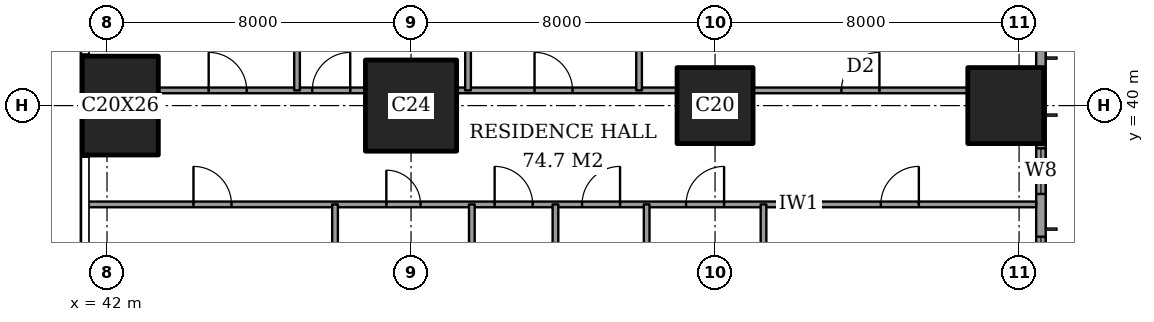
"""IFC4 building model, lengths in metres.
Left out: names, types, materials, properties, quantities, classifications, styles, units other than length and angle.
Written with IfcOpenShell. Run it as: python <this file> out.ifc"""

import sys

from ifc_helpers import new_model, si_unit, direction, frame, frame_2d, origin, origin_2d, place, context, subcontext, project, spatial, rectangle, extrude, element, fill, save


model = new_model("IFC4")
c1 = context("Model", 3, precision=1e-05, world=origin(), true_north=direction((0.0, 1.0)))
c2 = subcontext(c1, "Body", "Model", "MODEL_VIEW")
j1 = project(units=[si_unit("LENGTHUNIT", "METRE"), si_unit("PLANEANGLEUNIT", "RADIAN")], contexts=[c1])
p1 = place(None, origin())
s1 = spatial("IfcSite", under=j1, at=p1, CompositionType="ELEMENT")
p2 = place(p1, origin())
s2 = spatial("IfcBuilding", under=s1, at=p2, CompositionType="ELEMENT")
p3 = place(p2, frame((0.0, 0.0, 69.2)))
s3 = spatial("IfcBuildingStorey", under=s2, at=p3, CompositionType="ELEMENT", Elevation=69.2)
p4 = place(p3, frame((42.35, 40.0, 0.0), z_axis=(0.0, 0.0, 1.0), x_axis=(1.0, 0.0, 0.0)))
e1 = element("IfcColumn", 1, at=p4, inside=s3, PredefinedType="COLUMN", context=c2, shape_type="SweptSolid", body=[
    extrude(rectangle(XDim=2.0, YDim=2.6, at=origin_2d()), origin(), (0.0, 0.0, 1.0), 3.6),
])
p5 = place(p3, frame((50.0, 40.0, 0.0), z_axis=(0.0, 0.0, 1.0), x_axis=(1.0, 0.0, 0.0)))
e2 = element("IfcColumn", 2, at=p5, inside=s3, PredefinedType="COLUMN", context=c2, shape_type="SweptSolid", body=[
    extrude(rectangle(XDim=2.4, YDim=2.4, at=origin_2d()), origin(), (0.0, 0.0, 1.0), 3.6),
])
for number, where, z_axis, x_axis in (
    (3, (58.0, 40.0, 0.0), (0.0, 0.0, 1.0), (1.0, 0.0, 0.0)),
    (4, (65.65, 40.0, 0.0), (0.0, 0.0, 1.0), (1.0, 0.0, 0.0)),
):
    element("IfcColumn", number, at=place(p3, frame(where, z_axis=z_axis, x_axis=x_axis)), inside=s3, PredefinedType="COLUMN", context=c2, shape_type="SweptSolid", body=[
        extrude(rectangle(XDim=2.0, YDim=2.0, at=origin_2d()), origin(), (0.0, 0.0, 1.0), 3.6),
    ])
p6 = place(p3, frame((66.575, 3.175, 0.0), z_axis=(0.0, 0.0, 1.0), x_axis=(0.0, 1.0, 0.0)))
e5 = element("IfcWall", 5, at=p6, inside=s3, PredefinedType="SOLIDWALL", context=c2, shape_type="SweptSolid", body=[
    extrude(rectangle(XDim=41.65, YDim=0.25, at=frame_2d((20.825, 0.0))), origin(), (0.0, 0.0, 1.0), 3.6),
])
p7 = place(p6, frame((0.775, 0.0, 0.6)))
e6 = element("IfcOpeningElement", 6, at=p7, cuts=e5, PredefinedType="OPENING", context=c2, shape_type="SweptSolid", body=[
    extrude(rectangle(XDim=2.4, YDim=2.0, at=frame_2d((1.2, 1.0))), frame((0.0, 0.135, 0.0), z_axis=(0.0, -1.0, 0.0), x_axis=(1.0, 0.0, 0.0)), (0.0, 0.0, 1.0), 0.27),
])
p8 = place(p6, frame((6.1, 0.0, 0.6)))
e7 = element("IfcOpeningElement", 7, at=p8, cuts=e5, PredefinedType="OPENING", context=c2, shape_type="SweptSolid", body=[
    extrude(rectangle(XDim=1.2, YDim=2.0, at=frame_2d((0.6, 1.0))), frame((0.0, 0.135, 0.0), z_axis=(0.0, -1.0, 0.0), x_axis=(1.0, 0.0, 0.0)), (0.0, 0.0, 1.0), 0.27),
])
p9 = place(p6, frame((8.275, 0.0, 0.6)))
e8 = element("IfcOpeningElement", 8, at=p9, cuts=e5, PredefinedType="OPENING", context=c2, shape_type="SweptSolid", body=[
    extrude(rectangle(XDim=2.4, YDim=2.0, at=frame_2d((1.2, 1.0))), frame((0.0, 0.135, 0.0), z_axis=(0.0, -1.0, 0.0), x_axis=(1.0, 0.0, 0.0)), (0.0, 0.0, 1.0), 0.27),
])
p10 = place(p6, frame((15.775, 0.0, 0.6)))
e9 = element("IfcOpeningElement", 9, at=p10, cuts=e5, PredefinedType="OPENING", context=c2, shape_type="SweptSolid", body=[
    extrude(rectangle(XDim=2.4, YDim=2.0, at=frame_2d((1.2, 1.0))), frame((0.0, 0.135, 0.0), z_axis=(0.0, -1.0, 0.0), x_axis=(1.0, 0.0, 0.0)), (0.0, 0.0, 1.0), 0.27),
])
p11 = place(p6, frame((23.475, 0.0, 0.6)))
e10 = element("IfcOpeningElement", 10, at=p11, cuts=e5, PredefinedType="OPENING", context=c2, shape_type="SweptSolid", body=[
    extrude(rectangle(XDim=2.4, YDim=2.0, at=frame_2d((1.2, 1.0))), frame((0.0, 0.135, 0.0), z_axis=(0.0, -1.0, 0.0), x_axis=(1.0, 0.0, 0.0)), (0.0, 0.0, 1.0), 0.27),
])
p12 = place(p6, frame((30.975, 0.0, 0.6)))
e11 = element("IfcOpeningElement", 11, at=p12, cuts=e5, PredefinedType="OPENING", context=c2, shape_type="SweptSolid", body=[
    extrude(rectangle(XDim=2.4, YDim=2.0, at=frame_2d((1.2, 1.0))), frame((0.0, 0.135, 0.0), z_axis=(0.0, -1.0, 0.0), x_axis=(1.0, 0.0, 0.0)), (0.0, 0.0, 1.0), 0.27),
])
p13 = place(p6, frame((34.5, 0.0, 0.6)))
e12 = element("IfcOpeningElement", 12, at=p13, cuts=e5, PredefinedType="OPENING", context=c2, shape_type="SweptSolid", body=[
    extrude(rectangle(XDim=1.2, YDim=2.0, at=frame_2d((0.6, 1.0))), frame((0.0, 0.135, 0.0), z_axis=(0.0, -1.0, 0.0), x_axis=(1.0, 0.0, 0.0)), (0.0, 0.0, 1.0), 0.27),
])
p14 = place(p6, frame((38.475, 0.0, 0.6)))
e13 = element("IfcOpeningElement", 13, at=p14, cuts=e5, PredefinedType="OPENING", context=c2, shape_type="SweptSolid", body=[
    extrude(rectangle(XDim=2.4, YDim=2.0, at=frame_2d((1.2, 1.0))), frame((0.0, 0.135, 0.0), z_axis=(0.0, -1.0, 0.0), x_axis=(1.0, 0.0, 0.0)), (0.0, 0.0, 1.0), 0.27),
])
p15 = place(p3, frame((41.439, 37.4, 0.0), z_axis=(0.0, 0.0, 1.0), x_axis=(1.0, 0.0, 0.0)))
e14 = element("IfcWall", 14, at=p15, inside=s3, PredefinedType="PARTITIONING", context=c2, shape_type="SweptSolid", body=[
    extrude(rectangle(XDim=25.011, YDim=0.15, at=frame_2d((12.505, 0.0))), origin(), (0.0, 0.0, 1.0), 3.35),
])
p16 = place(p15, frame((10.761, 0.0, 0.0)))
e15 = element("IfcOpeningElement", 15, at=p16, cuts=e14, PredefinedType="OPENING", context=c2, shape_type="SweptSolid", body=[
    extrude(rectangle(XDim=1.0, YDim=2.1, at=frame_2d((0.5, 1.05))), frame((0.0, 0.085, 0.0), z_axis=(0.0, -1.0, 0.0), x_axis=(1.0, 0.0, 0.0)), (0.0, 0.0, 1.0), 0.17),
])
p17 = place(p15, frame((20.924, 0.0, 0.0)))
e16 = element("IfcOpeningElement", 16, at=p17, cuts=e14, PredefinedType="OPENING", context=c2, shape_type="SweptSolid", body=[
    extrude(rectangle(XDim=1.0, YDim=2.1, at=frame_2d((0.5, 1.05))), frame((0.0, 0.085, 0.0), z_axis=(0.0, -1.0, 0.0), x_axis=(1.0, 0.0, 0.0)), (0.0, 0.0, 1.0), 0.17),
])
p18 = place(p15, frame((15.799, 0.0, 0.0)))
e17 = element("IfcOpeningElement", 17, at=p18, cuts=e14, PredefinedType="OPENING", context=c2, shape_type="SweptSolid", body=[
    extrude(rectangle(XDim=1.0, YDim=2.1, at=frame_2d((0.5, 1.05))), frame((0.0, 0.085, 0.0), z_axis=(0.0, -1.0, 0.0), x_axis=(1.0, 0.0, 0.0)), (0.0, 0.0, 1.0), 0.17),
])
p19 = place(p15, frame((13.061, 0.0, 0.0)))
e18 = element("IfcOpeningElement", 18, at=p19, cuts=e14, PredefinedType="OPENING", context=c2, shape_type="SweptSolid", body=[
    extrude(rectangle(XDim=1.0, YDim=2.1, at=frame_2d((0.5, 1.05))), frame((0.0, 0.085, 0.0), z_axis=(0.0, -1.0, 0.0), x_axis=(1.0, 0.0, 0.0)), (0.0, 0.0, 1.0), 0.17),
])
p20 = place(p15, frame((7.911, 0.0, 0.0)))
e19 = element("IfcOpeningElement", 19, at=p20, cuts=e14, PredefinedType="OPENING", context=c2, shape_type="SweptSolid", body=[
    extrude(rectangle(XDim=0.9, YDim=2.1, at=frame_2d((0.45, 1.05))), frame((0.0, 0.085, 0.0), z_axis=(0.0, -1.0, 0.0), x_axis=(1.0, 0.0, 0.0)), (0.0, 0.0, 1.0), 0.17),
])
p21 = place(p15, frame((2.836, 0.0, 0.0)))
e20 = element("IfcOpeningElement", 20, at=p21, cuts=e14, PredefinedType="OPENING", context=c2, shape_type="SweptSolid", body=[
    extrude(rectangle(XDim=1.0, YDim=2.1, at=frame_2d((0.5, 1.05))), frame((0.0, 0.085, 0.0), z_axis=(0.0, -1.0, 0.0), x_axis=(1.0, 0.0, 0.0)), (0.0, 0.0, 1.0), 0.17),
])
p22 = place(p3, frame((43.35, 40.4, 0.0), z_axis=(0.0, 0.0, 1.0), x_axis=(1.0, 0.0, 0.0)))
e21 = element("IfcWall", 21, at=p22, inside=s3, PredefinedType="PARTITIONING", context=c2, shape_type="SweptSolid", body=[
    extrude(rectangle(XDim=5.45, YDim=0.15, at=frame_2d((2.725, 0.0))), origin(), (0.0, 0.0, 1.0), 3.35),
])
p23 = place(p22, frame((4.05, 0.0, 0.0)))
e22 = element("IfcOpeningElement", 22, at=p23, cuts=e21, PredefinedType="OPENING", context=c2, shape_type="SweptSolid", body=[
    extrude(rectangle(XDim=1.0, YDim=2.1, at=frame_2d((0.5, 1.05))), frame((0.0, 0.085, 0.0), z_axis=(0.0, -1.0, 0.0), x_axis=(1.0, 0.0, 0.0)), (0.0, 0.0, 1.0), 0.17),
])
p24 = place(p22, frame((1.325, 0.0, 0.0)))
e23 = element("IfcOpeningElement", 23, at=p24, cuts=e21, PredefinedType="OPENING", context=c2, shape_type="SweptSolid", body=[
    extrude(rectangle(XDim=1.0, YDim=2.1, at=frame_2d((0.5, 1.05))), frame((0.0, 0.085, 0.0), z_axis=(0.0, -1.0, 0.0), x_axis=(1.0, 0.0, 0.0)), (0.0, 0.0, 1.0), 0.17),
])
p25 = place(p3, frame((51.2, 40.4, 0.0), z_axis=(0.0, 0.0, 1.0), x_axis=(1.0, 0.0, 0.0)))
e24 = element("IfcWall", 24, at=p25, inside=s3, PredefinedType="PARTITIONING", context=c2, shape_type="SweptSolid", body=[
    extrude(rectangle(XDim=5.8, YDim=0.15, at=frame_2d((2.9, 0.0))), origin(), (0.0, 0.0, 1.0), 3.35),
])
p26 = place(p25, frame((2.05, 0.0, 0.0)))
e25 = element("IfcOpeningElement", 25, at=p26, cuts=e24, PredefinedType="OPENING", context=c2, shape_type="SweptSolid", body=[
    extrude(rectangle(XDim=1.0, YDim=2.1, at=frame_2d((0.5, 1.05))), frame((0.0, 0.085, 0.0), z_axis=(0.0, -1.0, 0.0), x_axis=(1.0, 0.0, 0.0)), (0.0, 0.0, 1.0), 0.17),
])
p27 = place(p3, frame((59.0, 40.4, 0.0), z_axis=(0.0, 0.0, 1.0), x_axis=(1.0, 0.0, 0.0)))
e26 = element("IfcWall", 26, at=p27, inside=s3, PredefinedType="PARTITIONING", context=c2, shape_type="SweptSolid", body=[
    extrude(rectangle(XDim=5.65, YDim=0.15, at=frame_2d((2.825, 0.0))), origin(), (0.0, 0.0, 1.0), 3.35),
])
p28 = place(p27, frame((2.325, 0.0, 0.0)))
e27 = element("IfcOpeningElement", 27, at=p28, cuts=e26, PredefinedType="OPENING", context=c2, shape_type="SweptSolid", body=[
    extrude(rectangle(XDim=1.0, YDim=2.1, at=frame_2d((0.5, 1.05))), frame((0.0, 0.085, 0.0), z_axis=(0.0, -1.0, 0.0), x_axis=(1.0, 0.0, 0.0)), (0.0, 0.0, 1.0), 0.17),
])
p29 = place(p3, frame((47.0, 40.4, 0.0), z_axis=(0.0, 0.0, 1.0), x_axis=(0.0, 1.0, 0.0)))
e28 = element("IfcWall", 28, at=p29, inside=s3, PredefinedType="PARTITIONING", context=c2, shape_type="SweptSolid", body=[
    extrude(rectangle(XDim=8.05, YDim=0.15, at=frame_2d((4.025, 0.0))), origin(), (0.0, 0.0, 1.0), 3.35),
])
p30 = place(p3, frame((48.0, 28.0, 0.0), z_axis=(0.0, 0.0, 1.0), x_axis=(0.0, 1.0, 0.0)))
e29 = element("IfcWall", 29, at=p30, inside=s3, PredefinedType="PARTITIONING", context=c2, shape_type="SweptSolid", body=[
    extrude(rectangle(XDim=9.4, YDim=0.15, at=frame_2d((4.7, 0.0))), origin(), (0.0, 0.0, 1.0), 3.35),
])
p31 = place(p30, frame((0.325, 0.0, 0.0)))
e30 = element("IfcOpeningElement", 30, at=p31, cuts=e29, PredefinedType="OPENING", context=c2, shape_type="SweptSolid", body=[
    extrude(rectangle(XDim=0.9, YDim=2.1, at=frame_2d((0.45, 1.05))), frame((0.0, 0.085, 0.0), z_axis=(0.0, -1.0, 0.0), x_axis=(1.0, 0.0, 0.0)), (0.0, 0.0, 1.0), 0.17),
])
p32 = place(p3, frame((51.5, 40.4, 0.0), z_axis=(0.0, 0.0, 1.0), x_axis=(0.0, 1.0, 0.0)))
e31 = element("IfcWall", 31, at=p32, inside=s3, PredefinedType="PARTITIONING", context=c2, shape_type="SweptSolid", body=[
    extrude(rectangle(XDim=8.05, YDim=0.15, at=frame_2d((4.025, 0.0))), origin(), (0.0, 0.0, 1.0), 3.35),
])
for number, where, z_axis, x_axis in (
    (32, (51.6, 29.55, 0.0), (0.0, 0.0, 1.0), (0.0, 1.0, 0.0)),
    (33, (53.8, 29.55, 0.0), (0.0, 0.0, 1.0), (0.0, 1.0, 0.0)),
):
    element("IfcWall", number, at=place(p3, frame(where, z_axis=z_axis, x_axis=x_axis)), inside=s3, PredefinedType="PARTITIONING", context=c2, shape_type="SweptSolid", body=[
        extrude(rectangle(XDim=7.85, YDim=0.15, at=frame_2d((3.925, 0.0))), origin(), (0.0, 0.0, 1.0), 3.35),
    ])
p33 = place(p3, frame((56.0, 40.4, 0.0), z_axis=(0.0, 0.0, 1.0), x_axis=(0.0, 1.0, 0.0)))
e34 = element("IfcWall", 34, at=p33, inside=s3, PredefinedType="PARTITIONING", context=c2, shape_type="SweptSolid", body=[
    extrude(rectangle(XDim=8.05, YDim=0.15, at=frame_2d((4.025, 0.0))), origin(), (0.0, 0.0, 1.0), 3.35),
])
p34 = place(p3, frame((56.2, 28.0, 0.0), z_axis=(0.0, 0.0, 1.0), x_axis=(0.0, 1.0, 0.0)))
e35 = element("IfcWall", 35, at=p34, inside=s3, PredefinedType="PARTITIONING", context=c2, shape_type="SweptSolid", body=[
    extrude(rectangle(XDim=9.4, YDim=0.15, at=frame_2d((4.7, 0.0))), origin(), (0.0, 0.0, 1.0), 3.35),
])
p35 = place(p34, frame((0.325, 0.0, 0.0)))
e36 = element("IfcOpeningElement", 36, at=p35, cuts=e35, PredefinedType="OPENING", context=c2, shape_type="SweptSolid", body=[
    extrude(rectangle(XDim=0.9, YDim=2.1, at=frame_2d((0.45, 1.05))), frame((0.0, 0.085, 0.0), z_axis=(0.0, -1.0, 0.0), x_axis=(1.0, 0.0, 0.0)), (0.0, 0.0, 1.0), 0.17),
])
p36 = place(p3, frame((59.275, 33.2, 0.0), z_axis=(0.0, 0.0, 1.0), x_axis=(0.0, 1.0, 0.0)))
e37 = element("IfcWall", 37, at=p36, inside=s3, PredefinedType="PARTITIONING", context=c2, shape_type="SweptSolid", body=[
    extrude(rectangle(XDim=4.2, YDim=0.15, at=frame_2d((2.1, 0.0))), origin(), (0.0, 0.0, 1.0), 3.35),
])
p37 = place(p12, origin())
e38 = element("IfcWindow", 38, at=p37, inside=s3, PartitioningType="SINGLE_PANEL", PredefinedType="WINDOW", context=c2, shape_type="SweptSolid", body=[
    extrude(rectangle(XDim=2.4, YDim=2.0, at=frame_2d((1.2, 1.0))), frame((0.0, 0.03, 0.0), z_axis=(0.0, -1.0, 0.0), x_axis=(1.0, 0.0, 0.0)), (0.0, 0.0, 1.0), 0.06),
])
fill(e11, e38)
p38 = place(p13, origin())
e39 = element("IfcWindow", 39, at=p38, inside=s3, PartitioningType="SINGLE_PANEL", PredefinedType="WINDOW", context=c2, shape_type="SweptSolid", body=[
    extrude(rectangle(XDim=1.2, YDim=2.0, at=frame_2d((0.6, 1.0))), frame((0.0, 0.03, 0.0), z_axis=(0.0, -1.0, 0.0), x_axis=(1.0, 0.0, 0.0)), (0.0, 0.0, 1.0), 0.06),
])
fill(e12, e39)
p39 = place(p28, origin())
e40 = element("IfcDoor", 40, at=p39, inside=s3, OperationType="SINGLE_SWING_LEFT", PredefinedType="DOOR", context=c2, shape_type="SweptSolid", body=[
    extrude(rectangle(XDim=1.0, YDim=2.1, at=frame_2d((0.5, 1.05))), frame((0.0, 0.025, 0.0), z_axis=(0.0, -1.0, 0.0), x_axis=(1.0, 0.0, 0.0)), (0.0, 0.0, 1.0), 0.05),
])
fill(e27, e40)
p40 = place(p26, origin())
e41 = element("IfcDoor", 41, at=p40, inside=s3, OperationType="SINGLE_SWING_RIGHT", PredefinedType="DOOR", context=c2, shape_type="SweptSolid", body=[
    extrude(rectangle(XDim=1.0, YDim=2.1, at=frame_2d((0.5, 1.05))), frame((0.0, 0.025, 0.0), z_axis=(0.0, -1.0, 0.0), x_axis=(1.0, 0.0, 0.0)), (0.0, 0.0, 1.0), 0.05),
])
fill(e25, e41)
p41 = place(p23, origin())
e42 = element("IfcDoor", 42, at=p41, inside=s3, OperationType="SINGLE_SWING_LEFT", PredefinedType="DOOR", context=c2, shape_type="SweptSolid", body=[
    extrude(rectangle(XDim=1.0, YDim=2.1, at=frame_2d((0.5, 1.05))), frame((0.0, 0.025, 0.0), z_axis=(0.0, -1.0, 0.0), x_axis=(1.0, 0.0, 0.0)), (0.0, 0.0, 1.0), 0.05),
])
fill(e22, e42)
p42 = place(p24, origin())
e43 = element("IfcDoor", 43, at=p42, inside=s3, OperationType="SINGLE_SWING_RIGHT", PredefinedType="DOOR", context=c2, shape_type="SweptSolid", body=[
    extrude(rectangle(XDim=1.0, YDim=2.1, at=frame_2d((0.5, 1.05))), frame((0.0, 0.025, 0.0), z_axis=(0.0, -1.0, 0.0), x_axis=(1.0, 0.0, 0.0)), (0.0, 0.0, 1.0), 0.05),
])
fill(e23, e43)
p43 = place(p16, origin())
e44 = element("IfcDoor", 44, at=p43, inside=s3, OperationType="SINGLE_SWING_RIGHT", PredefinedType="DOOR", context=c2, shape_type="SweptSolid", body=[
    extrude(rectangle(XDim=1.0, YDim=2.1, at=frame_2d((0.5, 1.05))), frame((0.0, 0.025, 0.0), z_axis=(0.0, -1.0, 0.0), x_axis=(1.0, 0.0, 0.0)), (0.0, 0.0, 1.0), 0.05),
])
fill(e15, e44)
p44 = place(p17, origin())
e45 = element("IfcDoor", 45, at=p44, inside=s3, OperationType="SINGLE_SWING_LEFT", PredefinedType="DOOR", context=c2, shape_type="SweptSolid", body=[
    extrude(rectangle(XDim=1.0, YDim=2.1, at=frame_2d((0.5, 1.05))), frame((0.0, 0.025, 0.0), z_axis=(0.0, -1.0, 0.0), x_axis=(1.0, 0.0, 0.0)), (0.0, 0.0, 1.0), 0.05),
])
fill(e16, e45)
p45 = place(p18, origin())
e46 = element("IfcDoor", 46, at=p45, inside=s3, OperationType="SINGLE_SWING_LEFT", PredefinedType="DOOR", context=c2, shape_type="SweptSolid", body=[
    extrude(rectangle(XDim=1.0, YDim=2.1, at=frame_2d((0.5, 1.05))), frame((0.0, 0.025, 0.0), z_axis=(0.0, -1.0, 0.0), x_axis=(1.0, 0.0, 0.0)), (0.0, 0.0, 1.0), 0.05),
])
fill(e17, e46)
p46 = place(p19, origin())
e47 = element("IfcDoor", 47, at=p46, inside=s3, OperationType="SINGLE_SWING_LEFT", PredefinedType="DOOR", context=c2, shape_type="SweptSolid", body=[
    extrude(rectangle(XDim=1.0, YDim=2.1, at=frame_2d((0.5, 1.05))), frame((0.0, 0.025, 0.0), z_axis=(0.0, -1.0, 0.0), x_axis=(1.0, 0.0, 0.0)), (0.0, 0.0, 1.0), 0.05),
])
fill(e18, e47)
p47 = place(p20, origin())
e48 = element("IfcDoor", 48, at=p47, inside=s3, OperationType="SINGLE_SWING_RIGHT", PredefinedType="DOOR", context=c2, shape_type="SweptSolid", body=[
    extrude(rectangle(XDim=0.9, YDim=2.1, at=frame_2d((0.45, 1.05))), frame((0.0, 0.025, 0.0), z_axis=(0.0, -1.0, 0.0), x_axis=(1.0, 0.0, 0.0)), (0.0, 0.0, 1.0), 0.05),
])
fill(e19, e48)
p48 = place(p21, origin())
e49 = element("IfcDoor", 49, at=p48, inside=s3, OperationType="SINGLE_SWING_RIGHT", PredefinedType="DOOR", context=c2, shape_type="SweptSolid", body=[
    extrude(rectangle(XDim=1.0, YDim=2.1, at=frame_2d((0.5, 1.05))), frame((0.0, 0.025, 0.0), z_axis=(0.0, -1.0, 0.0), x_axis=(1.0, 0.0, 0.0)), (0.0, 0.0, 1.0), 0.05),
])
fill(e20, e49)
save(model, sys.argv[1])
